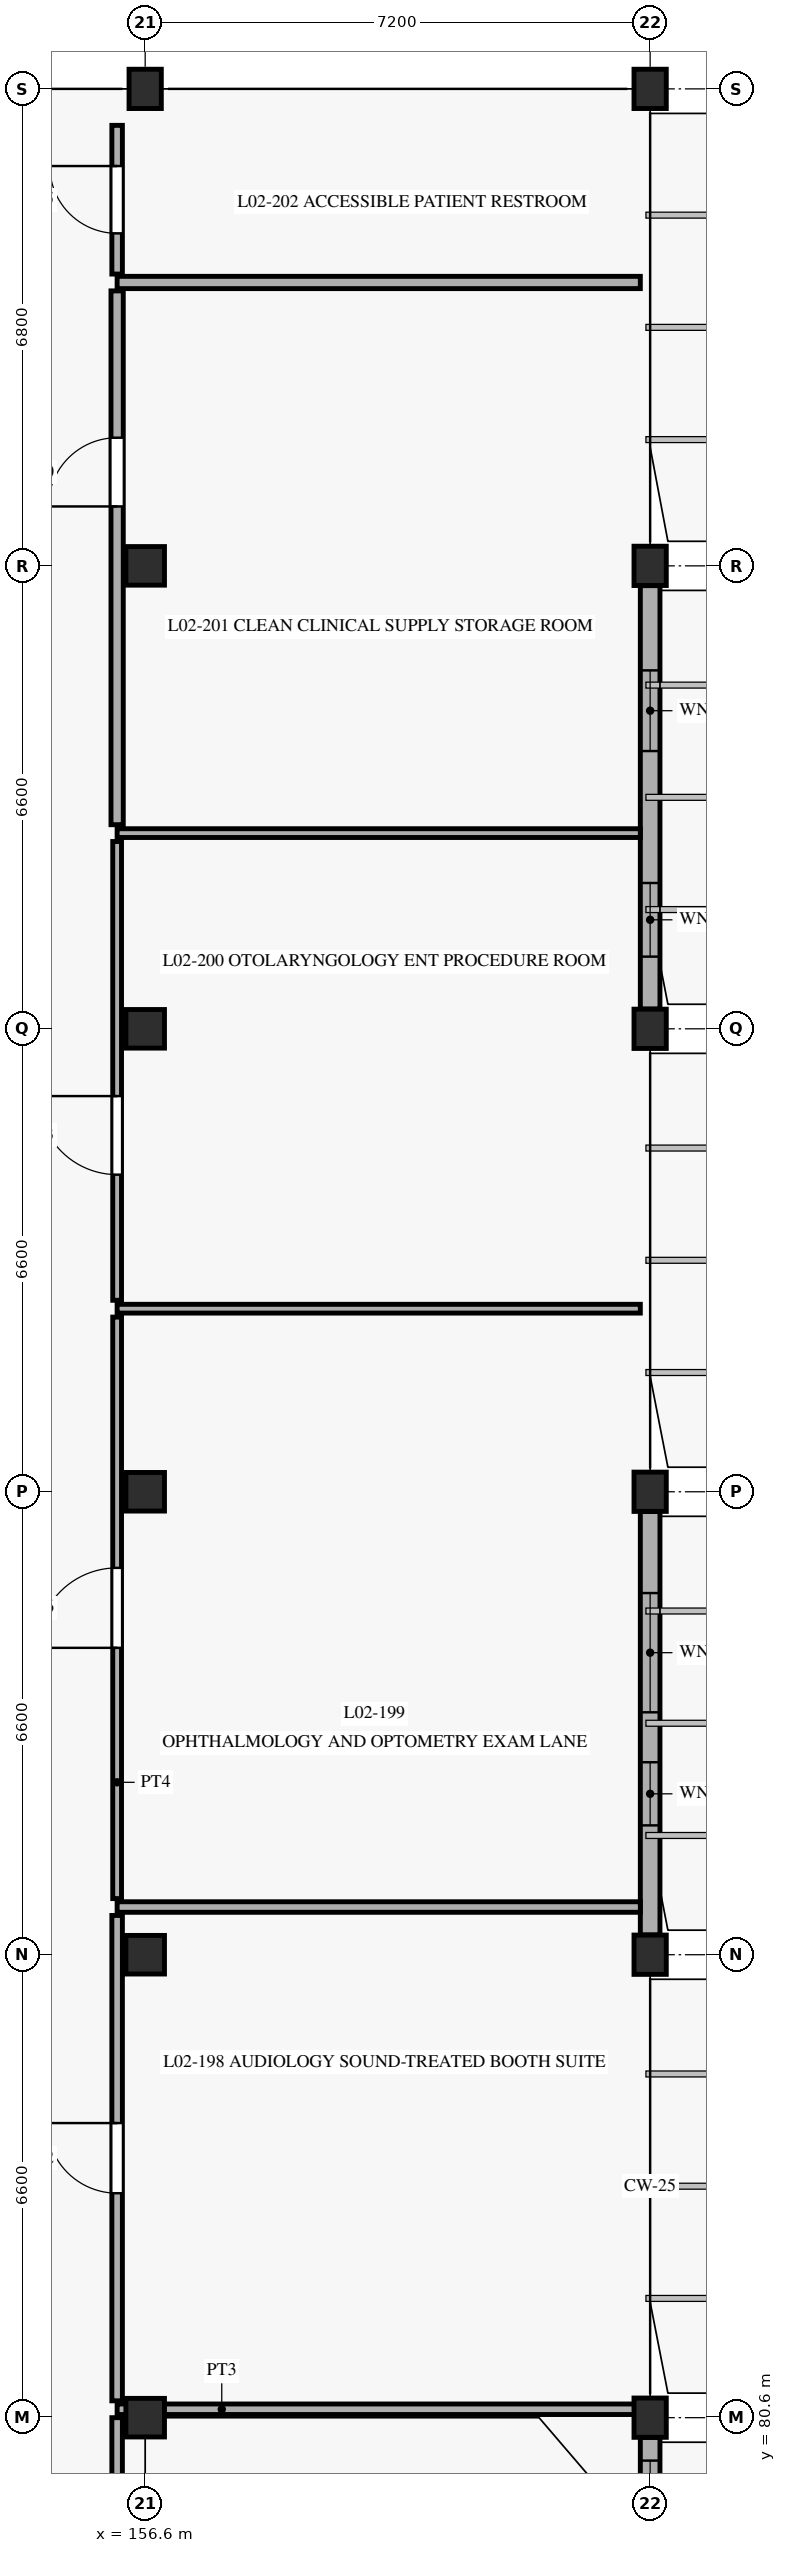
"""IFC4 building model, lengths in metres.
Left out: names, types, materials, properties, quantities, classifications, styles, units other than length and angle.
Written with IfcOpenShell. Run it as: python <this file> out.ifc"""

import sys

from ifc_helpers import new_model, si_unit, direction, frame, frame_2d, origin, origin_with_axes, origin_2d, place, context, subcontext, project, spatial, rectangle, extrude, element, fill, save


model = new_model("IFC4")
c1 = context("Model", 3, precision=1e-05, world=origin(), true_north=direction((0.0, 1.0)))
c2 = subcontext(c1, "Body", "Model", "MODEL_VIEW")
j1 = project(units=[si_unit("LENGTHUNIT", "METRE"), si_unit("PLANEANGLEUNIT", "RADIAN")], contexts=[c1])
p1 = place(None, origin())
s1 = spatial("IfcSite", under=j1, at=p1, CompositionType="ELEMENT")
p2 = place(p1, origin())
s2 = spatial("IfcBuilding", under=s1, at=p2, CompositionType="ELEMENT")
p3 = place(p2, frame((0.0, 0.0, 4.8)))
s3 = spatial("IfcBuildingStorey", under=s2, at=p3, CompositionType="ELEMENT", Elevation=4.8)
for number, where, z_axis, x_axis in (
    (1, (156.6, 80.6, 0.0), (0.0, 0.0, 1.0), (1.0, 0.0, 0.0)),
    (2, (156.6, 87.2, 0.0), (0.0, 0.0, 1.0), (1.0, 0.0, 0.0)),
    (3, (156.6, 93.8, 0.0), (0.0, 0.0, 1.0), (1.0, 0.0, 0.0)),
    (4, (156.6, 100.4, 0.0), (0.0, 0.0, 1.0), (1.0, 0.0, 0.0)),
    (5, (156.6, 107.0, 0.0), (0.0, 0.0, 1.0), (1.0, 0.0, 0.0)),
):
    element("IfcColumn", number, at=place(p3, frame(where, z_axis=z_axis, x_axis=x_axis)), inside=s3, PredefinedType="COLUMN", context=c2, shape_type="SweptSolid", body=[
        extrude(rectangle(XDim=0.55, YDim=0.55, at=origin_2d()), origin(), (0.0, 0.0, 1.0), 4.5),
    ])
for number, where, z_axis, x_axis in (
    (6, (156.6, 113.8, 0.0), (0.0, 0.0, 1.0), (1.0, 0.0, 0.0)),
    (7, (163.8, 80.6, 0.0), (0.0, 0.0, 1.0), (1.0, 0.0, 0.0)),
    (8, (163.8, 87.2, 0.0), (0.0, 0.0, 1.0), (1.0, 0.0, 0.0)),
    (9, (163.8, 93.8, 0.0), (0.0, 0.0, 1.0), (1.0, 0.0, 0.0)),
    (10, (163.8, 100.4, 0.0), (0.0, 0.0, 1.0), (1.0, 0.0, 0.0)),
    (11, (163.8, 107.0, 0.0), (0.0, 0.0, 1.0), (1.0, 0.0, 0.0)),
    (12, (163.8, 113.8, 0.0), (0.0, 0.0, 1.0), (1.0, 0.0, 0.0)),
):
    element("IfcColumn", number, at=place(p3, frame(where, z_axis=z_axis, x_axis=x_axis)), inside=s3, PredefinedType="COLUMN", context=c2, shape_type="SweptSolid", body=[
        extrude(rectangle(XDim=0.46, YDim=0.56, at=origin_2d()), origin(), (0.0, 0.0, 1.0), 4.5),
    ])
p4 = place(p3, frame((163.8, 72.482, 0.0), z_axis=(0.0, 0.0, 1.0), x_axis=(0.0, 1.0, 0.0)))
e13 = element("IfcWall", 13, at=p4, inside=s3, PredefinedType="SOLIDWALL", context=c2, shape_type="SweptSolid", body=[
    extrude(rectangle(XDim=7.836, YDim=0.28, at=frame_2d((3.918, 0.0))), origin(), (0.0, 0.0, 1.0), 3.65),
])
p5 = place(p4, frame((2.05, 0.0, 0.88)))
e14 = element("IfcOpeningElement", 14, at=p5, cuts=e13, PredefinedType="OPENING", context=c2, shape_type="SweptSolid", body=[
    extrude(rectangle(XDim=1.8, YDim=2.05, at=frame_2d((0.9, 1.025))), frame((0.0, 0.15, 0.0), z_axis=(0.0, -1.0, 0.0), x_axis=(1.0, 0.0, 0.0)), (0.0, 0.0, 1.0), 0.3),
])
p6 = place(p4, frame((6.206, 0.0, 0.88)))
e15 = element("IfcOpeningElement", 15, at=p6, cuts=e13, PredefinedType="OPENING", context=c2, shape_type="SweptSolid", body=[
    extrude(rectangle(XDim=1.3, YDim=1.7, at=frame_2d((0.65, 0.85))), frame((0.0, 0.15, 0.0), z_axis=(0.0, -1.0, 0.0), x_axis=(1.0, 0.0, 0.0)), (0.0, 0.0, 1.0), 0.3),
])
p7 = place(p3, frame((163.8, 87.482, 0.0), z_axis=(0.0, 0.0, 1.0), x_axis=(0.0, 1.0, 0.0)))
e16 = element("IfcWall", 16, at=p7, inside=s3, PredefinedType="SOLIDWALL", context=c2, shape_type="SweptSolid", body=[
    extrude(rectangle(XDim=6.036, YDim=0.28, at=frame_2d((3.018, 0.0))), origin(), (0.0, 0.0, 1.0), 3.65),
])
p8 = place(p7, frame((1.562, 0.0, 0.88)))
e17 = element("IfcOpeningElement", 17, at=p8, cuts=e16, PredefinedType="OPENING", context=c2, shape_type="SweptSolid", body=[
    extrude(rectangle(XDim=0.9, YDim=2.2, at=frame_2d((0.45, 1.1))), frame((0.0, 0.15, 0.0), z_axis=(0.0, -1.0, 0.0), x_axis=(1.0, 0.0, 0.0)), (0.0, 0.0, 1.0), 0.3),
])
p9 = place(p7, frame((3.174, 0.0, 0.88)))
e18 = element("IfcOpeningElement", 18, at=p9, cuts=e16, PredefinedType="OPENING", context=c2, shape_type="SweptSolid", body=[
    extrude(rectangle(XDim=1.7, YDim=1.7, at=frame_2d((0.85, 0.85))), frame((0.0, 0.15, 0.0), z_axis=(0.0, -1.0, 0.0), x_axis=(1.0, 0.0, 0.0)), (0.0, 0.0, 1.0), 0.3),
])
p10 = place(p3, frame((163.8, 100.682, 0.0), z_axis=(0.0, 0.0, 1.0), x_axis=(0.0, 1.0, 0.0)))
e19 = element("IfcWall", 19, at=p10, inside=s3, PredefinedType="SOLIDWALL", context=c2, shape_type="SweptSolid", body=[
    extrude(rectangle(XDim=6.036, YDim=0.28, at=frame_2d((3.018, 0.0))), origin(), (0.0, 0.0, 1.0), 3.65),
])
p11 = place(p10, frame((0.747, 0.0, 0.88)))
e20 = element("IfcOpeningElement", 20, at=p11, cuts=e19, PredefinedType="OPENING", context=c2, shape_type="SweptSolid", body=[
    extrude(rectangle(XDim=1.05, YDim=2.2, at=frame_2d((0.525, 1.1))), frame((0.0, 0.15, 0.0), z_axis=(0.0, -1.0, 0.0), x_axis=(1.0, 0.0, 0.0)), (0.0, 0.0, 1.0), 0.3),
])
p12 = place(p10, frame((3.678, 0.0, 0.88)))
e21 = element("IfcOpeningElement", 21, at=p12, cuts=e19, PredefinedType="OPENING", context=c2, shape_type="SweptSolid", body=[
    extrude(rectangle(XDim=1.15, YDim=1.65, at=frame_2d((0.575, 0.825))), frame((0.0, 0.15, 0.0), z_axis=(0.0, -1.0, 0.0), x_axis=(1.0, 0.0, 0.0)), (0.0, 0.0, 1.0), 0.3),
])
p13 = place(p3, frame((156.2, 78.49, 0.0), z_axis=(0.0, 0.0, 1.0), x_axis=(0.0, 1.0, 0.0)))
e22 = element("IfcWall", 22, at=p13, inside=s3, PredefinedType="PARTITIONING", context=c2, shape_type="SweptSolid", body=[
    extrude(rectangle(XDim=2.11, YDim=0.15, at=frame_2d((1.055, 0.0))), origin(), (0.0, 0.0, 1.0), 3.795),
])
p14 = place(p13, frame((0.339, 0.0, 0.0)))
e23 = element("IfcOpeningElement", 23, at=p14, cuts=e22, PredefinedType="OPENING", context=c2, shape_type="SweptSolid", body=[
    extrude(rectangle(XDim=0.96, YDim=2.1, at=frame_2d((0.48, 1.05))), frame((0.0, 0.085, 0.0), z_axis=(0.0, -1.0, 0.0), x_axis=(1.0, 0.0, 0.0)), (0.0, 0.0, 1.0), 0.17),
])
p15 = place(p3, frame((156.2, 80.72, 0.0), z_axis=(0.0, 0.0, 1.0), x_axis=(1.0, 0.0, 0.0)))
e24 = element("IfcWall", 24, at=p15, inside=s3, PredefinedType="PARTITIONING", context=c2, shape_type="SweptSolid", body=[
    extrude(rectangle(XDim=7.46, YDim=0.15, at=frame_2d((3.73, 0.0))), origin(), (0.0, 0.0, 1.0), 3.795),
])
p16 = place(p3, frame((156.2, 80.84, 0.0), z_axis=(0.0, 0.0, 1.0), x_axis=(0.0, 1.0, 0.0)))
e25 = element("IfcWall", 25, at=p16, inside=s3, PredefinedType="PARTITIONING", context=c2, shape_type="SweptSolid", body=[
    extrude(rectangle(XDim=6.92, YDim=0.15, at=frame_2d((3.46, 0.0))), origin(), (0.0, 0.0, 1.0), 3.795),
])
p17 = place(p16, frame((2.96, 0.0, 0.0)))
e26 = element("IfcOpeningElement", 26, at=p17, cuts=e25, PredefinedType="OPENING", context=c2, shape_type="SweptSolid", body=[
    extrude(rectangle(XDim=1.0, YDim=2.15, at=frame_2d((0.5, 1.075))), frame((0.0, 0.085, 0.0), z_axis=(0.0, -1.0, 0.0), x_axis=(1.0, 0.0, 0.0)), (0.0, 0.0, 1.0), 0.17),
])
p18 = place(p3, frame((156.2, 87.88, 0.0), z_axis=(0.0, 0.0, 1.0), x_axis=(1.0, 0.0, 0.0)))
e27 = element("IfcWall", 27, at=p18, inside=s3, PredefinedType="PARTITIONING", context=c2, shape_type="SweptSolid", body=[
    extrude(rectangle(XDim=7.46, YDim=0.15, at=frame_2d((3.73, 0.0))), origin(), (0.0, 0.0, 1.0), 3.645),
])
p19 = place(p3, frame((156.2, 88.0, 0.0), z_axis=(0.0, 0.0, 1.0), x_axis=(0.0, 1.0, 0.0)))
e28 = element("IfcWall", 28, at=p19, inside=s3, PredefinedType="PARTITIONING", context=c2, shape_type="SweptSolid", body=[
    extrude(rectangle(XDim=8.29, YDim=0.125, at=frame_2d((4.145, 0.0))), origin(), (0.0, 0.0, 1.0), 3.795),
])
p20 = place(p19, frame((3.575, 0.0, 0.0)))
e29 = element("IfcOpeningElement", 29, at=p20, cuts=e28, PredefinedType="OPENING", context=c2, shape_type="SweptSolid", body=[
    extrude(rectangle(XDim=1.14, YDim=2.22, at=frame_2d((0.57, 1.11))), frame((0.0, 0.073, 0.0), z_axis=(0.0, -1.0, 0.0), x_axis=(1.0, 0.0, 0.0)), (0.0, 0.0, 1.0), 0.145),
])
p21 = place(p3, frame((156.2, 96.41, 0.0), z_axis=(0.0, 0.0, 1.0), x_axis=(1.0, 0.0, 0.0)))
e30 = element("IfcWall", 30, at=p21, inside=s3, PredefinedType="PARTITIONING", context=c2, shape_type="SweptSolid", body=[
    extrude(rectangle(XDim=7.46, YDim=0.125, at=frame_2d((3.73, 0.0))), origin(), (0.0, 0.0, 1.0), 3.645),
])
p22 = place(p3, frame((156.2, 96.53, 0.0), z_axis=(0.0, 0.0, 1.0), x_axis=(0.0, 1.0, 0.0)))
e31 = element("IfcWall", 31, at=p22, inside=s3, PredefinedType="PARTITIONING", context=c2, shape_type="SweptSolid", body=[
    extrude(rectangle(XDim=6.54, YDim=0.125, at=frame_2d((3.27, 0.0))), origin(), (0.0, 0.0, 1.0), 3.795),
])
p23 = place(p22, frame((1.791, 0.0, 0.0)))
e32 = element("IfcOpeningElement", 32, at=p23, cuts=e31, PredefinedType="OPENING", context=c2, shape_type="SweptSolid", body=[
    extrude(rectangle(XDim=1.12, YDim=2.2, at=frame_2d((0.56, 1.1))), frame((0.0, 0.073, 0.0), z_axis=(0.0, -1.0, 0.0), x_axis=(1.0, 0.0, 0.0)), (0.0, 0.0, 1.0), 0.145),
])
p24 = place(p3, frame((156.2, 103.19, 0.0), z_axis=(0.0, 0.0, 1.0), x_axis=(1.0, 0.0, 0.0)))
e33 = element("IfcWall", 33, at=p24, inside=s3, PredefinedType="PARTITIONING", context=c2, shape_type="SweptSolid", body=[
    extrude(rectangle(XDim=7.46, YDim=0.125, at=frame_2d((3.73, 0.0))), origin(), (0.0, 0.0, 1.0), 3.645),
])
p25 = place(p3, frame((156.2, 103.31, 0.0), z_axis=(0.0, 0.0, 1.0), x_axis=(0.0, 1.0, 0.0)))
e34 = element("IfcWall", 34, at=p25, inside=s3, PredefinedType="PARTITIONING", context=c2, shape_type="SweptSolid", body=[
    extrude(rectangle(XDim=7.61, YDim=0.175, at=frame_2d((3.805, 0.0))), origin(), (0.0, 0.0, 1.0), 3.795),
])
p26 = place(p25, frame((4.537, 0.0, 0.0)))
e35 = element("IfcOpeningElement", 35, at=p26, cuts=e34, PredefinedType="OPENING", context=c2, shape_type="SweptSolid", body=[
    extrude(rectangle(XDim=0.98, YDim=2.12, at=frame_2d((0.49, 1.06))), frame((0.0, 0.098, 0.0), z_axis=(0.0, -1.0, 0.0), x_axis=(1.0, 0.0, 0.0)), (0.0, 0.0, 1.0), 0.195),
])
p27 = place(p3, frame((156.2, 111.04, 0.0), z_axis=(0.0, 0.0, 1.0), x_axis=(1.0, 0.0, 0.0)))
e36 = element("IfcWall", 36, at=p27, inside=s3, PredefinedType="PARTITIONING", context=c2, shape_type="SweptSolid", body=[
    extrude(rectangle(XDim=7.46, YDim=0.175, at=frame_2d((3.73, 0.0))), origin(), (0.0, 0.0, 1.0), 3.645),
])
p28 = place(p3, frame((156.2, 111.16, 0.0), z_axis=(0.0, 0.0, 1.0), x_axis=(0.0, 1.0, 0.0)))
e37 = element("IfcWall", 37, at=p28, inside=s3, PredefinedType="PARTITIONING", context=c2, shape_type="SweptSolid", body=[
    extrude(rectangle(XDim=2.12, YDim=0.15, at=frame_2d((1.06, 0.0))), origin(), (0.0, 0.0, 1.0), 4.195),
])
p29 = place(p28, frame((0.58, 0.0, 0.0)))
e38 = element("IfcOpeningElement", 38, at=p29, cuts=e37, PredefinedType="OPENING", context=c2, shape_type="SweptSolid", body=[
    extrude(rectangle(XDim=0.96, YDim=2.1, at=frame_2d((0.48, 1.05))), frame((0.0, 0.085, 0.0), z_axis=(0.0, -1.0, 0.0), x_axis=(1.0, 0.0, 0.0)), (0.0, 0.0, 1.0), 0.17),
])
p30 = place(p6, origin_with_axes())
e39 = element("IfcWindow", 39, at=p30, inside=s3, PartitioningType="SINGLE_PANEL", PredefinedType="WINDOW", context=c2, shape_type="SweptSolid", body=[
    extrude(rectangle(XDim=1.3, YDim=1.7, at=frame_2d((0.65, 0.85))), frame((0.0, 0.03, 0.0), z_axis=(0.0, -1.0, 0.0), x_axis=(1.0, 0.0, 0.0)), (0.0, 0.0, 1.0), 0.06),
])
fill(e15, e39)
p31 = place(p8, origin_with_axes())
e40 = element("IfcWindow", 40, at=p31, inside=s3, PartitioningType="SINGLE_PANEL", PredefinedType="WINDOW", context=c2, shape_type="SweptSolid", body=[
    extrude(rectangle(XDim=0.9, YDim=2.2, at=frame_2d((0.45, 1.1))), frame((0.0, 0.03, 0.0), z_axis=(0.0, -1.0, 0.0), x_axis=(1.0, 0.0, 0.0)), (0.0, 0.0, 1.0), 0.06),
])
fill(e17, e40)
p32 = place(p9, origin_with_axes())
e41 = element("IfcWindow", 41, at=p32, inside=s3, PartitioningType="SINGLE_PANEL", PredefinedType="WINDOW", context=c2, shape_type="SweptSolid", body=[
    extrude(rectangle(XDim=1.7, YDim=1.7, at=frame_2d((0.85, 0.85))), frame((0.0, 0.03, 0.0), z_axis=(0.0, -1.0, 0.0), x_axis=(1.0, 0.0, 0.0)), (0.0, 0.0, 1.0), 0.06),
])
fill(e18, e41)
p33 = place(p11, origin_with_axes())
e42 = element("IfcWindow", 42, at=p33, inside=s3, PartitioningType="SINGLE_PANEL", PredefinedType="WINDOW", context=c2, shape_type="SweptSolid", body=[
    extrude(rectangle(XDim=1.05, YDim=2.2, at=frame_2d((0.525, 1.1))), frame((0.0, 0.03, 0.0), z_axis=(0.0, -1.0, 0.0), x_axis=(1.0, 0.0, 0.0)), (0.0, 0.0, 1.0), 0.06),
])
fill(e20, e42)
p34 = place(p12, origin_with_axes())
e43 = element("IfcWindow", 43, at=p34, inside=s3, PartitioningType="SINGLE_PANEL", PredefinedType="WINDOW", context=c2, shape_type="SweptSolid", body=[
    extrude(rectangle(XDim=1.15, YDim=1.65, at=frame_2d((0.575, 0.825))), frame((0.0, 0.03, 0.0), z_axis=(0.0, -1.0, 0.0), x_axis=(1.0, 0.0, 0.0)), (0.0, 0.0, 1.0), 0.06),
])
fill(e21, e43)
p35 = place(p17, frame((1.0, 0.0, 0.0), z_axis=(0.0, 0.0, 1.0), x_axis=(-1.0, 0.0, 0.0)))
e44 = element("IfcDoor", 44, at=p35, inside=s3, OperationType="SINGLE_SWING_LEFT", PredefinedType="DOOR", context=c2, shape_type="SweptSolid", body=[
    extrude(rectangle(XDim=1.0, YDim=2.15, at=frame_2d((0.5, 1.075))), frame((0.0, 0.025, 0.0), z_axis=(0.0, -1.0, 0.0), x_axis=(1.0, 0.0, 0.0)), (0.0, 0.0, 1.0), 0.05),
])
fill(e26, e44)
p36 = place(p20, frame((1.14, 0.0, 0.0), z_axis=(0.0, 0.0, 1.0), x_axis=(-1.0, 0.0, 0.0)))
e45 = element("IfcDoor", 45, at=p36, inside=s3, OperationType="SINGLE_SWING_RIGHT", PredefinedType="DOOR", context=c2, shape_type="SweptSolid", body=[
    extrude(rectangle(XDim=1.14, YDim=2.22, at=frame_2d((0.57, 1.11))), frame((0.0, 0.025, 0.0), z_axis=(0.0, -1.0, 0.0), x_axis=(1.0, 0.0, 0.0)), (0.0, 0.0, 1.0), 0.05),
])
fill(e29, e45)
p37 = place(p23, frame((1.12, 0.0, 0.0), z_axis=(0.0, 0.0, 1.0), x_axis=(-1.0, 0.0, 0.0)))
e46 = element("IfcDoor", 46, at=p37, inside=s3, OperationType="SINGLE_SWING_LEFT", PredefinedType="DOOR", context=c2, shape_type="SweptSolid", body=[
    extrude(rectangle(XDim=1.12, YDim=2.2, at=frame_2d((0.56, 1.1))), frame((0.0, 0.025, 0.0), z_axis=(0.0, -1.0, 0.0), x_axis=(1.0, 0.0, 0.0)), (0.0, 0.0, 1.0), 0.05),
])
fill(e32, e46)
p38 = place(p26, frame((0.98, 0.0, 0.0), z_axis=(0.0, 0.0, 1.0), x_axis=(-1.0, 0.0, 0.0)))
e47 = element("IfcDoor", 47, at=p38, inside=s3, OperationType="SINGLE_SWING_RIGHT", PredefinedType="DOOR", context=c2, shape_type="SweptSolid", body=[
    extrude(rectangle(XDim=0.98, YDim=2.12, at=frame_2d((0.49, 1.06))), frame((0.0, 0.025, 0.0), z_axis=(0.0, -1.0, 0.0), x_axis=(1.0, 0.0, 0.0)), (0.0, 0.0, 1.0), 0.05),
])
fill(e35, e47)
p39 = place(p29, frame((0.96, 0.0, 0.0), z_axis=(0.0, 0.0, 1.0), x_axis=(-1.0, 0.0, 0.0)))
e48 = element("IfcDoor", 48, at=p39, inside=s3, OperationType="SINGLE_SWING_LEFT", PredefinedType="DOOR", context=c2, shape_type="SweptSolid", body=[
    extrude(rectangle(XDim=0.96, YDim=2.1, at=frame_2d((0.48, 1.05))), frame((0.0, 0.025, 0.0), z_axis=(0.0, -1.0, 0.0), x_axis=(1.0, 0.0, 0.0)), (0.0, 0.0, 1.0), 0.05),
])
fill(e38, e48)
save(model, sys.argv[1])
